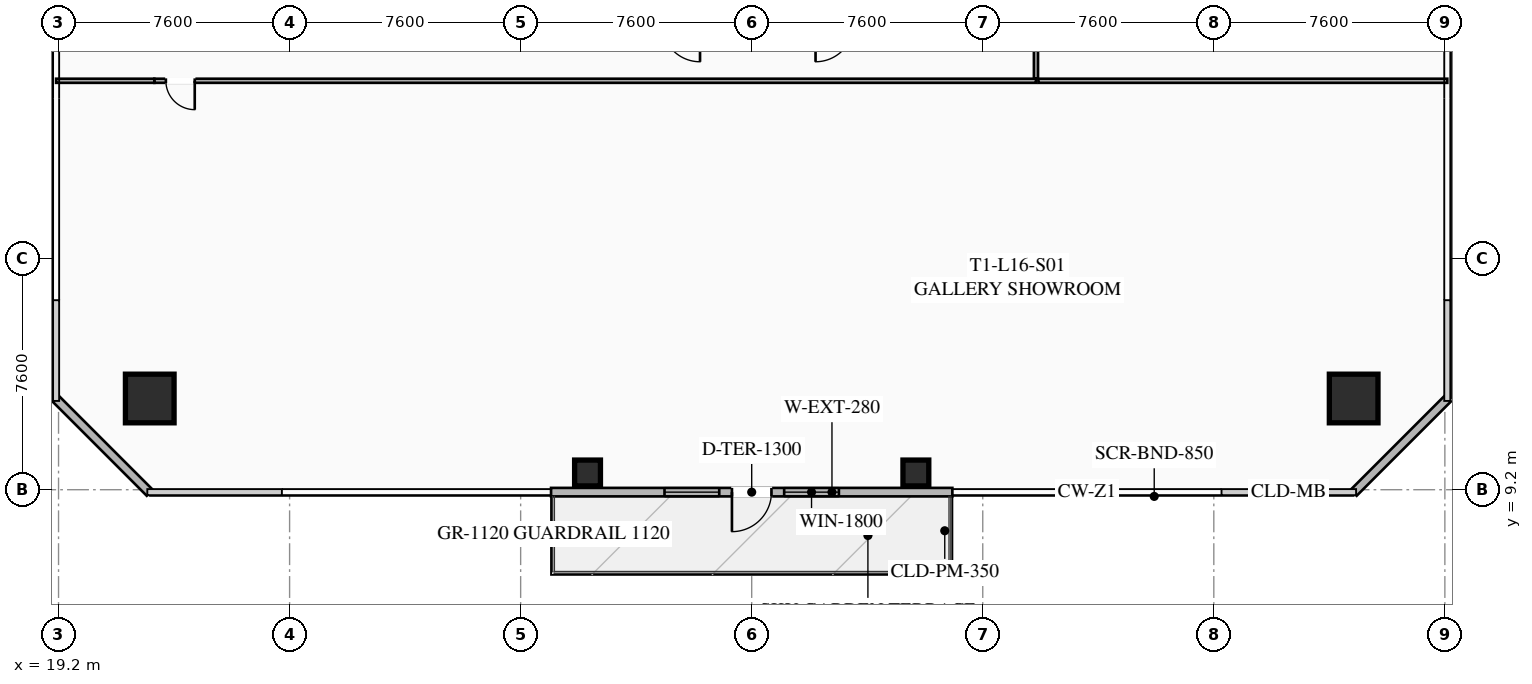
"""IFC4 building model, lengths in metres.
Left out: names, types, materials, properties, quantities, classifications, styles, units other than length and angle.
Written with IfcOpenShell. Run it as: python <this file> out.ifc"""

import sys

from ifc_helpers import new_model, si_unit, direction, frame, frame_2d, origin, origin_2d, place, context, subcontext, project, spatial, rectangle, hollow_rectangle, extrude, element, fill, save


model = new_model("IFC4")
c1 = context("Model", 3, precision=1e-05, world=origin(), true_north=direction((0.0, 1.0)))
c2 = subcontext(c1, "Body", "Model", "MODEL_VIEW")
j1 = project(units=[si_unit("LENGTHUNIT", "METRE"), si_unit("PLANEANGLEUNIT", "RADIAN")], contexts=[c1])
p1 = place(None, origin())
s1 = spatial("IfcSite", under=j1, at=p1, CompositionType="ELEMENT")
p2 = place(p1, origin())
s2 = spatial("IfcBuilding", under=s1, at=p2, CompositionType="ELEMENT")
p3 = place(p2, frame((0.0, 0.0, 63.65)))
s3 = spatial("IfcBuildingStorey", under=s2, at=p3, CompositionType="ELEMENT", Elevation=63.65)
for number, where, z_axis, x_axis in (
    (1, (22.2, 12.2, 0.0), (0.0, 0.0, 1.0), (1.0, 0.0, 0.0)),
    (2, (61.8, 12.2, 0.0), (0.0, 0.0, 1.0), (1.0, 0.0, 0.0)),
):
    element("IfcColumn", number, at=place(p3, frame(where, z_axis=z_axis, x_axis=x_axis)), inside=s3, PredefinedType="COLUMN", context=c2, shape_type="SweptSolid", body=[
        extrude(hollow_rectangle(XDim=1.6, YDim=1.6, WallThickness=0.06, at=origin_2d()), origin(), (0.0, 0.0, 1.0), 3.35),
    ])
for number, where, z_axis, x_axis in (
    (3, (36.6, 9.75, 0.0), (0.0, 0.0, 1.0), (1.0, 0.0, 0.0)),
    (4, (47.4, 9.75, 0.0), (0.0, 0.0, 1.0), (1.0, 0.0, 0.0)),
):
    element("IfcColumn", number, at=place(p3, frame(where, z_axis=z_axis, x_axis=x_axis)), inside=s3, PredefinedType="COLUMN", context=c2, shape_type="SweptSolid", body=[
        extrude(hollow_rectangle(XDim=0.85, YDim=0.85, WallThickness=0.035, at=origin_2d()), origin(), (0.0, 0.0, 1.0), 3.35),
    ])
p4 = place(p3, frame((48.6, 9.12, 0.0), z_axis=(0.0, 0.0, 1.0), x_axis=(-1.0, 0.0, 0.0)))
e5 = element("IfcWall", 5, at=p4, inside=s3, PredefinedType="SOLIDWALL", context=c2, shape_type="SweptSolid", body=[
    extrude(rectangle(XDim=13.2, YDim=0.28, at=frame_2d((6.6, 0.0))), origin(), (0.0, 0.0, 1.0), 3.35),
])
p5 = place(p4, frame((5.95, 0.0, 0.0)))
e6 = element("IfcOpeningElement", 6, at=p5, cuts=e5, PredefinedType="OPENING", context=c2, shape_type="SweptSolid", body=[
    extrude(rectangle(XDim=1.3, YDim=2.15, at=frame_2d((0.65, 1.075))), frame((0.0, 0.15, 0.0), z_axis=(0.0, -1.0, 0.0), x_axis=(1.0, 0.0, 0.0)), (0.0, 0.0, 1.0), 0.3),
])
p6 = place(p4, frame((3.732, 0.0, 0.85)))
e7 = element("IfcOpeningElement", 7, at=p6, cuts=e5, PredefinedType="OPENING", context=c2, shape_type="SweptSolid", body=[
    extrude(rectangle(XDim=1.8, YDim=1.92, at=frame_2d((0.9, 0.96))), frame((0.0, 0.15, 0.0), z_axis=(0.0, -1.0, 0.0), x_axis=(1.0, 0.0, 0.0)), (0.0, 0.0, 1.0), 0.3),
])
p7 = place(p4, frame((7.668, 0.0, 0.85)))
e8 = element("IfcOpeningElement", 8, at=p7, cuts=e5, PredefinedType="OPENING", context=c2, shape_type="SweptSolid", body=[
    extrude(rectangle(XDim=1.8, YDim=1.92, at=frame_2d((0.9, 0.96))), frame((0.0, 0.15, 0.0), z_axis=(0.0, -1.0, 0.0), x_axis=(1.0, 0.0, 0.0)), (0.0, 0.0, 1.0), 0.3),
])
for number, where, z_axis, x_axis in (
    (9, (22.2, 9.1, 0.0), (0.0, 0.0, 1.0), (-0.707, 0.707, 0.0)),
    (10, (64.9, 12.2, 0.0), (0.0, 0.0, 1.0), (-0.707, -0.707, 0.0)),
):
    element("IfcWall", number, at=place(p3, frame(where, z_axis=z_axis, x_axis=x_axis)), inside=s3, PredefinedType="SOLIDWALL", context=c2, shape_type="SweptSolid", body=[
        extrude(rectangle(XDim=4.384, YDim=0.28, at=frame_2d((2.192, 0.0))), origin(), (0.0, 0.0, 1.0), 3.35),
    ])
p8 = place(p3, frame((51.35, 22.65, 0.0), z_axis=(0.0, 0.0, 1.0), x_axis=(-1.0, 0.0, 0.0)))
e11 = element("IfcWall", 11, at=p8, inside=s3, PredefinedType="PARTITIONING", context=c2, shape_type="SweptSolid", body=[
    extrude(rectangle(XDim=29.0, YDim=0.135, at=frame_2d((14.5, 0.0))), origin(), (0.0, 0.0, 1.0), 2.493),
])
p9 = place(p8, frame((27.67, 0.0, 0.0)))
e12 = element("IfcOpeningElement", 12, at=p9, cuts=e11, PredefinedType="OPENING", context=c2, shape_type="SweptSolid", body=[
    extrude(rectangle(XDim=0.95, YDim=2.05, at=frame_2d((0.475, 1.025))), frame((0.0, 0.077, 0.0), z_axis=(0.0, -1.0, 0.0), x_axis=(1.0, 0.0, 0.0)), (0.0, 0.0, 1.0), 0.155),
])
p10 = place(p3, frame((19.12, 22.65, 0.0), z_axis=(0.0, 0.0, 1.0), x_axis=(1.0, 0.0, 0.0)))
e13 = element("IfcWall", 13, at=p10, inside=s3, PredefinedType="PARTITIONING", context=c2, shape_type="SweptSolid", body=[
    extrude(rectangle(XDim=3.23, YDim=0.135, at=frame_2d((1.615, 0.0))), origin(), (0.0, 0.0, 1.0), 2.493),
])
p11 = place(p3, frame((51.35, 43.09, 0.0), z_axis=(0.0, 0.0, 1.0), x_axis=(0.0, -1.0, 0.0)))
e14 = element("IfcWall", 14, at=p11, inside=s3, PredefinedType="PARTITIONING", context=c2, shape_type="SweptSolid", body=[
    extrude(rectangle(XDim=20.36, YDim=0.135, at=frame_2d((10.18, 0.0))), origin(), (0.0, 0.0, 1.0), 2.493),
])
p12 = place(p11, frame((10.332, 0.0, 0.0)))
e15 = element("IfcOpeningElement", 15, at=p12, cuts=e14, PredefinedType="OPENING", context=c2, shape_type="SweptSolid", body=[
    extrude(rectangle(XDim=0.95, YDim=2.05, at=frame_2d((0.475, 1.025))), frame((0.0, 0.077, 0.0), z_axis=(0.0, -1.0, 0.0), x_axis=(1.0, 0.0, 0.0)), (0.0, 0.0, 1.0), 0.155),
])
p13 = place(p3, frame((51.43, 22.65, 0.0), z_axis=(0.0, 0.0, 1.0), x_axis=(1.0, 0.0, 0.0)))
e16 = element("IfcWall", 16, at=p13, inside=s3, PredefinedType="PARTITIONING", context=c2, shape_type="SweptSolid", body=[
    extrude(rectangle(XDim=13.45, YDim=0.135, at=frame_2d((6.725, 0.0))), origin(), (0.0, 0.0, 1.0), 2.493),
])
p14 = place(p5, origin())
e17 = element("IfcDoor", 17, at=p14, inside=s3, OperationType="SINGLE_SWING_RIGHT", PredefinedType="DOOR", context=c2, shape_type="SweptSolid", body=[
    extrude(rectangle(XDim=1.3, YDim=2.15, at=frame_2d((0.65, 1.075))), frame((0.0, 0.025, 0.0), z_axis=(0.0, -1.0, 0.0), x_axis=(1.0, 0.0, 0.0)), (0.0, 0.0, 1.0), 0.05),
])
fill(e6, e17)
p15 = place(p6, origin())
e18 = element("IfcWindow", 18, at=p15, inside=s3, PartitioningType="SINGLE_PANEL", PredefinedType="WINDOW", context=c2, shape_type="SweptSolid", body=[
    extrude(rectangle(XDim=1.8, YDim=1.92, at=frame_2d((0.9, 0.96))), frame((0.0, 0.03, 0.0), z_axis=(0.0, -1.0, 0.0), x_axis=(1.0, 0.0, 0.0)), (0.0, 0.0, 1.0), 0.06),
])
fill(e7, e18)
p16 = place(p7, origin())
e19 = element("IfcWindow", 19, at=p16, inside=s3, PartitioningType="SINGLE_PANEL", PredefinedType="WINDOW", context=c2, shape_type="SweptSolid", body=[
    extrude(rectangle(XDim=1.8, YDim=1.92, at=frame_2d((0.9, 0.96))), frame((0.0, 0.03, 0.0), z_axis=(0.0, -1.0, 0.0), x_axis=(1.0, 0.0, 0.0)), (0.0, 0.0, 1.0), 0.06),
])
fill(e8, e19)
p17 = place(p9, origin())
e20 = element("IfcDoor", 20, at=p17, inside=s3, OperationType="SINGLE_SWING_LEFT", PredefinedType="DOOR", context=c2, shape_type="SweptSolid", body=[
    extrude(rectangle(XDim=0.95, YDim=2.05, at=frame_2d((0.475, 1.025))), frame((0.0, 0.025, 0.0), z_axis=(0.0, -1.0, 0.0), x_axis=(1.0, 0.0, 0.0)), (0.0, 0.0, 1.0), 0.05),
])
fill(e12, e20)
save(model, sys.argv[1])
